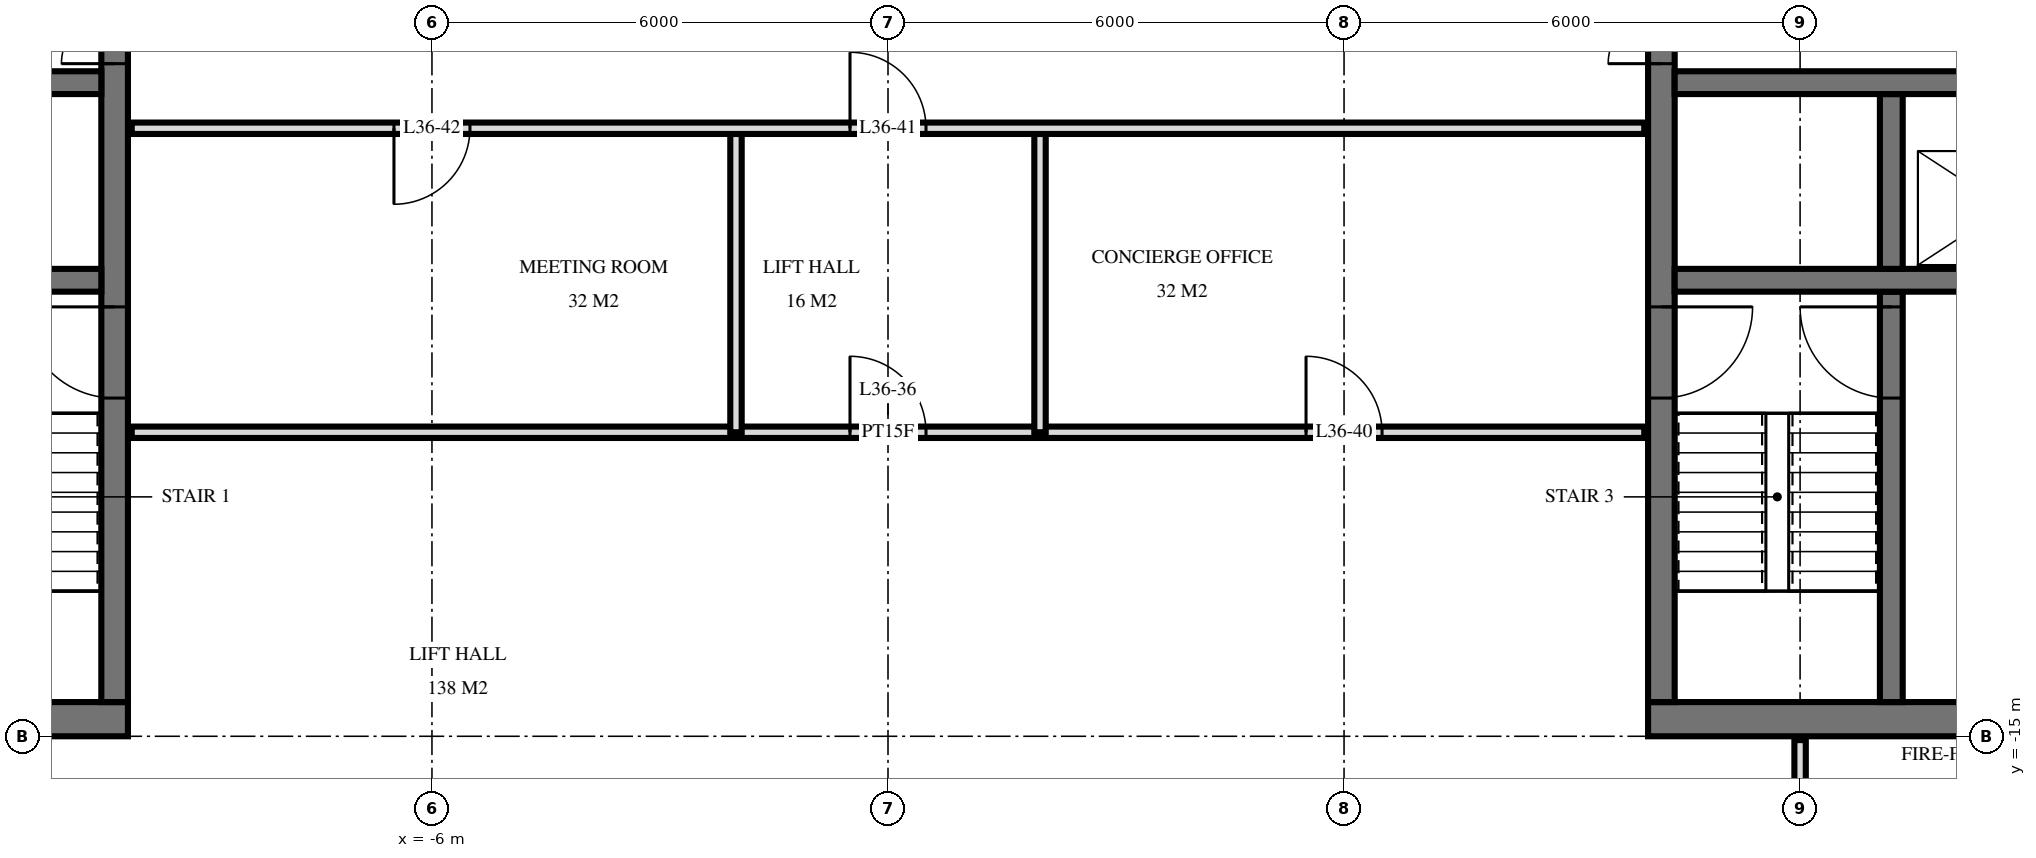
"""IFC4 building model, lengths in metres.
Left out: names, types, materials, properties, quantities, classifications, styles, units other than length and angle.
Written with IfcOpenShell. Run it as: python <this file> out.ifc"""

import sys

from ifc_helpers import new_model, si_unit, direction, frame, frame_2d, origin, place, context, subcontext, project, spatial, rectangle, extrude, element, fill, save


model = new_model("IFC4")
c1 = context("Model", 3, precision=1e-05, world=origin(), true_north=direction((0.0, 1.0)))
c2 = subcontext(c1, "Body", "Model", "MODEL_VIEW")
j1 = project(units=[si_unit("LENGTHUNIT", "METRE"), si_unit("PLANEANGLEUNIT", "RADIAN")], contexts=[c1])
p1 = place(None, origin())
s1 = spatial("IfcSite", under=j1, at=p1, CompositionType="ELEMENT")
p2 = place(p1, origin())
s2 = spatial("IfcBuilding", under=s1, at=p2, CompositionType="ELEMENT")
p3 = place(p2, frame((0.0, 0.0, 141.6)))
s3 = spatial("IfcBuildingStorey", under=s2, at=p3, CompositionType="ELEMENT", Elevation=141.6)
p4 = place(p3, frame((-24.5, -14.775, 0.0), z_axis=(0.0, 0.0, 1.0), x_axis=(1.0, 0.0, 0.0)))
e1 = element("IfcWall", 1, at=p4, inside=s3, PredefinedType="SHEAR", context=c2, shape_type="SweptSolid", body=[
    extrude(rectangle(XDim=14.5, YDim=0.45, at=frame_2d((7.25, 0.0))), origin(), (0.0, 0.0, 1.0), 3.6),
])
p5 = place(p4, frame((6.2, 0.0, 0.0)))
e2 = element("IfcOpeningElement", 2, at=p5, cuts=e1, PredefinedType="OPENING", context=c2, shape_type="SweptSolid", body=[
    extrude(rectangle(XDim=1.2, YDim=2.1, at=frame_2d((0.6, 1.05))), frame((0.0, 0.235, 0.0), z_axis=(0.0, -1.0, 0.0), x_axis=(1.0, 0.0, 0.0)), (0.0, 0.0, 1.0), 0.47),
])
p6 = place(p4, frame((9.25, 0.0, 0.0)))
e3 = element("IfcOpeningElement", 3, at=p6, cuts=e1, PredefinedType="OPENING", context=c2, shape_type="SweptSolid", body=[
    extrude(rectangle(XDim=1.1, YDim=2.1, at=frame_2d((0.55, 1.05))), frame((0.0, 0.235, 0.0), z_axis=(0.0, -1.0, 0.0), x_axis=(1.0, 0.0, 0.0)), (0.0, 0.0, 1.0), 0.47),
])
p7 = place(p4, frame((3.5, 0.0, 0.0)))
e4 = element("IfcOpeningElement", 4, at=p7, cuts=e1, PredefinedType="OPENING", context=c2, shape_type="SweptSolid", body=[
    extrude(rectangle(XDim=0.9, YDim=2.1, at=frame_2d((0.45, 1.05))), frame((0.0, 0.235, 0.0), z_axis=(0.0, -1.0, 0.0), x_axis=(1.0, 0.0, 0.0)), (0.0, 0.0, 1.0), 0.47),
])
p8 = place(p4, frame((1.05, 0.0, 0.0)))
e5 = element("IfcOpeningElement", 5, at=p8, cuts=e1, PredefinedType="OPENING", context=c2, shape_type="SweptSolid", body=[
    extrude(rectangle(XDim=1.0, YDim=2.1, at=frame_2d((0.5, 1.05))), frame((0.0, 0.235, 0.0), z_axis=(0.0, -1.0, 0.0), x_axis=(1.0, 0.0, 0.0)), (0.0, 0.0, 1.0), 0.47),
])
p9 = place(p3, frame((-10.175, -14.55, 0.0), z_axis=(0.0, 0.0, 1.0), x_axis=(0.0, 1.0, 0.0)))
e6 = element("IfcWall", 6, at=p9, inside=s3, PredefinedType="SHEAR", context=c2, shape_type="SweptSolid", body=[
    extrude(rectangle(XDim=14.1, YDim=0.35, at=frame_2d((7.05, 0.0))), origin(), (0.0, 0.0, 1.0), 3.6),
])
p10 = place(p9, frame((8.4, 0.0, 0.0)))
e7 = element("IfcOpeningElement", 7, at=p10, cuts=e6, PredefinedType="OPENING", context=c2, shape_type="SweptSolid", body=[
    extrude(rectangle(XDim=1.4, YDim=2.4, at=frame_2d((0.7, 1.2))), frame((0.0, 0.185, 0.0), z_axis=(0.0, -1.0, 0.0), x_axis=(1.0, 0.0, 0.0)), (0.0, 0.0, 1.0), 0.37),
])
p11 = place(p9, frame((10.0, 0.0, 0.0)))
e8 = element("IfcOpeningElement", 8, at=p11, cuts=e6, PredefinedType="OPENING", context=c2, shape_type="SweptSolid", body=[
    extrude(rectangle(XDim=1.4, YDim=2.4, at=frame_2d((0.7, 1.2))), frame((0.0, 0.185, 0.0), z_axis=(0.0, -1.0, 0.0), x_axis=(1.0, 0.0, 0.0)), (0.0, 0.0, 1.0), 0.37),
])
p12 = place(p9, frame((4.0, 0.0, 0.0)))
e9 = element("IfcOpeningElement", 9, at=p12, cuts=e6, PredefinedType="OPENING", context=c2, shape_type="SweptSolid", body=[
    extrude(rectangle(XDim=1.2, YDim=2.1, at=frame_2d((0.6, 1.05))), frame((0.0, 0.185, 0.0), z_axis=(0.0, -1.0, 0.0), x_axis=(1.0, 0.0, 0.0)), (0.0, 0.0, 1.0), 0.37),
])
p13 = place(p3, frame((-24.05, -6.4, 0.0), z_axis=(0.0, 0.0, 1.0), x_axis=(1.0, 0.0, 0.0)))
e10 = element("IfcWall", 10, at=p13, inside=s3, PredefinedType="SHEAR", context=c2, shape_type="SweptSolid", body=[
    extrude(rectangle(XDim=13.7, YDim=0.3, at=frame_2d((6.85, 0.0))), origin(), (0.0, 0.0, 1.0), 3.6),
])
p14 = place(p13, frame((0.55, 0.0, 0.0)))
e11 = element("IfcOpeningElement", 11, at=p14, cuts=e10, PredefinedType="OPENING", context=c2, shape_type="SweptSolid", body=[
    extrude(rectangle(XDim=1.1, YDim=2.1, at=frame_2d((0.55, 1.05))), frame((0.0, 0.16, 0.0), z_axis=(0.0, -1.0, 0.0), x_axis=(1.0, 0.0, 0.0)), (0.0, 0.0, 1.0), 0.32),
])
p15 = place(p13, frame((5.8, 0.0, 0.0)))
e12 = element("IfcOpeningElement", 12, at=p15, cuts=e10, PredefinedType="OPENING", context=c2, shape_type="SweptSolid", body=[
    extrude(rectangle(XDim=1.1, YDim=2.1, at=frame_2d((0.55, 1.05))), frame((0.0, 0.16, 0.0), z_axis=(0.0, -1.0, 0.0), x_axis=(1.0, 0.0, 0.0)), (0.0, 0.0, 1.0), 0.32),
])
p16 = place(p3, frame((-24.05, -9.0, 0.0), z_axis=(0.0, 0.0, 1.0), x_axis=(1.0, 0.0, 0.0)))
e13 = element("IfcWall", 13, at=p16, inside=s3, PredefinedType="SHEAR", context=c2, shape_type="SweptSolid", body=[
    extrude(rectangle(XDim=13.7, YDim=0.3, at=frame_2d((6.85, 0.0))), origin(), (0.0, 0.0, 1.0), 3.6),
])
p17 = place(p16, frame((8.8, 0.0, 0.0)))
e14 = element("IfcOpeningElement", 14, at=p17, cuts=e13, PredefinedType="OPENING", context=c2, shape_type="SweptSolid", body=[
    extrude(rectangle(XDim=1.1, YDim=2.1, at=frame_2d((0.55, 1.05))), frame((0.0, 0.16, 0.0), z_axis=(0.0, -1.0, 0.0), x_axis=(1.0, 0.0, 0.0)), (0.0, 0.0, 1.0), 0.32),
])
p18 = place(p3, frame((10.0, -14.775, 0.0), z_axis=(0.0, 0.0, 1.0), x_axis=(1.0, 0.0, 0.0)))
e15 = element("IfcWall", 15, at=p18, inside=s3, PredefinedType="SHEAR", context=c2, shape_type="SweptSolid", body=[
    extrude(rectangle(XDim=14.5, YDim=0.45, at=frame_2d((7.25, 0.0))), origin(), (0.0, 0.0, 1.0), 3.6),
])
p19 = place(p18, frame((7.1, 0.0, 0.0)))
e16 = element("IfcOpeningElement", 16, at=p19, cuts=e15, PredefinedType="OPENING", context=c2, shape_type="SweptSolid", body=[
    extrude(rectangle(XDim=1.2, YDim=2.1, at=frame_2d((0.6, 1.05))), frame((0.0, 0.235, 0.0), z_axis=(0.0, -1.0, 0.0), x_axis=(1.0, 0.0, 0.0)), (0.0, 0.0, 1.0), 0.47),
])
p20 = place(p18, frame((4.15, 0.0, 0.0)))
e17 = element("IfcOpeningElement", 17, at=p20, cuts=e15, PredefinedType="OPENING", context=c2, shape_type="SweptSolid", body=[
    extrude(rectangle(XDim=1.1, YDim=2.1, at=frame_2d((0.55, 1.05))), frame((0.0, 0.235, 0.0), z_axis=(0.0, -1.0, 0.0), x_axis=(1.0, 0.0, 0.0)), (0.0, 0.0, 1.0), 0.47),
])
p21 = place(p18, frame((10.1, 0.0, 0.0)))
e18 = element("IfcOpeningElement", 18, at=p21, cuts=e15, PredefinedType="OPENING", context=c2, shape_type="SweptSolid", body=[
    extrude(rectangle(XDim=0.9, YDim=2.1, at=frame_2d((0.45, 1.05))), frame((0.0, 0.235, 0.0), z_axis=(0.0, -1.0, 0.0), x_axis=(1.0, 0.0, 0.0)), (0.0, 0.0, 1.0), 0.47),
])
p22 = place(p18, frame((12.45, 0.0, 0.0)))
e19 = element("IfcOpeningElement", 19, at=p22, cuts=e15, PredefinedType="OPENING", context=c2, shape_type="SweptSolid", body=[
    extrude(rectangle(XDim=1.0, YDim=2.1, at=frame_2d((0.5, 1.05))), frame((0.0, 0.235, 0.0), z_axis=(0.0, -1.0, 0.0), x_axis=(1.0, 0.0, 0.0)), (0.0, 0.0, 1.0), 0.47),
])
p23 = place(p3, frame((10.175, -14.55, 0.0), z_axis=(0.0, 0.0, 1.0), x_axis=(0.0, 1.0, 0.0)))
e20 = element("IfcWall", 20, at=p23, inside=s3, PredefinedType="SHEAR", context=c2, shape_type="SweptSolid", body=[
    extrude(rectangle(XDim=14.1, YDim=0.35, at=frame_2d((7.05, 0.0))), origin(), (0.0, 0.0, 1.0), 3.6),
])
p24 = place(p23, frame((8.4, 0.0, 0.0)))
e21 = element("IfcOpeningElement", 21, at=p24, cuts=e20, PredefinedType="OPENING", context=c2, shape_type="SweptSolid", body=[
    extrude(rectangle(XDim=1.4, YDim=2.4, at=frame_2d((0.7, 1.2))), frame((0.0, 0.185, 0.0), z_axis=(0.0, -1.0, 0.0), x_axis=(1.0, 0.0, 0.0)), (0.0, 0.0, 1.0), 0.37),
])
p25 = place(p23, frame((10.0, 0.0, 0.0)))
e22 = element("IfcOpeningElement", 22, at=p25, cuts=e20, PredefinedType="OPENING", context=c2, shape_type="SweptSolid", body=[
    extrude(rectangle(XDim=1.4, YDim=2.4, at=frame_2d((0.7, 1.2))), frame((0.0, 0.185, 0.0), z_axis=(0.0, -1.0, 0.0), x_axis=(1.0, 0.0, 0.0)), (0.0, 0.0, 1.0), 0.37),
])
p26 = place(p23, frame((4.0, 0.0, 0.0)))
e23 = element("IfcOpeningElement", 23, at=p26, cuts=e20, PredefinedType="OPENING", context=c2, shape_type="SweptSolid", body=[
    extrude(rectangle(XDim=1.2, YDim=2.1, at=frame_2d((0.6, 1.05))), frame((0.0, 0.185, 0.0), z_axis=(0.0, -1.0, 0.0), x_axis=(1.0, 0.0, 0.0)), (0.0, 0.0, 1.0), 0.37),
])
p27 = place(p3, frame((10.35, -6.4, 0.0), z_axis=(0.0, 0.0, 1.0), x_axis=(1.0, 0.0, 0.0)))
e24 = element("IfcWall", 24, at=p27, inside=s3, PredefinedType="SHEAR", context=c2, shape_type="SweptSolid", body=[
    extrude(rectangle(XDim=13.7, YDim=0.3, at=frame_2d((6.85, 0.0))), origin(), (0.0, 0.0, 1.0), 3.6),
])
p28 = place(p27, frame((12.05, 0.0, 0.0)))
e25 = element("IfcOpeningElement", 25, at=p28, cuts=e24, PredefinedType="OPENING", context=c2, shape_type="SweptSolid", body=[
    extrude(rectangle(XDim=1.1, YDim=2.1, at=frame_2d((0.55, 1.05))), frame((0.0, 0.16, 0.0), z_axis=(0.0, -1.0, 0.0), x_axis=(1.0, 0.0, 0.0)), (0.0, 0.0, 1.0), 0.32),
])
p29 = place(p27, frame((6.8, 0.0, 0.0)))
e26 = element("IfcOpeningElement", 26, at=p29, cuts=e24, PredefinedType="OPENING", context=c2, shape_type="SweptSolid", body=[
    extrude(rectangle(XDim=1.1, YDim=2.1, at=frame_2d((0.55, 1.05))), frame((0.0, 0.16, 0.0), z_axis=(0.0, -1.0, 0.0), x_axis=(1.0, 0.0, 0.0)), (0.0, 0.0, 1.0), 0.32),
])
p30 = place(p3, frame((10.35, -9.0, 0.0), z_axis=(0.0, 0.0, 1.0), x_axis=(1.0, 0.0, 0.0)))
e27 = element("IfcWall", 27, at=p30, inside=s3, PredefinedType="SHEAR", context=c2, shape_type="SweptSolid", body=[
    extrude(rectangle(XDim=13.7, YDim=0.3, at=frame_2d((6.85, 0.0))), origin(), (0.0, 0.0, 1.0), 3.6),
])
p31 = place(p30, frame((3.8, 0.0, 0.0)))
e28 = element("IfcOpeningElement", 28, at=p31, cuts=e27, PredefinedType="OPENING", context=c2, shape_type="SweptSolid", body=[
    extrude(rectangle(XDim=1.1, YDim=2.1, at=frame_2d((0.55, 1.05))), frame((0.0, 0.16, 0.0), z_axis=(0.0, -1.0, 0.0), x_axis=(1.0, 0.0, 0.0)), (0.0, 0.0, 1.0), 0.32),
])
p32 = place(p3, frame((13.2, -8.85, 0.0), z_axis=(0.0, 0.0, 1.0), x_axis=(0.0, 1.0, 0.0)))
e29 = element("IfcWall", 29, at=p32, inside=s3, PredefinedType="SHEAR", context=c2, shape_type="SweptSolid", body=[
    extrude(rectangle(XDim=2.3, YDim=0.3, at=frame_2d((1.15, 0.0))), origin(), (0.0, 0.0, 1.0), 3.6),
])
p33 = place(p3, frame((13.2, -14.55, 0.0), z_axis=(0.0, 0.0, 1.0), x_axis=(0.0, 1.0, 0.0)))
e30 = element("IfcWall", 30, at=p33, inside=s3, PredefinedType="SHEAR", context=c2, shape_type="SweptSolid", body=[
    extrude(rectangle(XDim=5.4, YDim=0.3, at=frame_2d((2.7, 0.0))), origin(), (0.0, 0.0, 1.0), 3.6),
])
p34 = place(p33, frame((4.0, 0.0, 0.0)))
e31 = element("IfcOpeningElement", 31, at=p34, cuts=e30, PredefinedType="OPENING", context=c2, shape_type="SweptSolid", body=[
    extrude(rectangle(XDim=1.2, YDim=2.1, at=frame_2d((0.6, 1.05))), frame((0.0, 0.16, 0.0), z_axis=(0.0, -1.0, 0.0), x_axis=(1.0, 0.0, 0.0)), (0.0, 0.0, 1.0), 0.32),
])
p35 = place(p3, frame((12.0, -17.4, 0.0), z_axis=(0.0, 0.0, 1.0), x_axis=(0.0, 1.0, 0.0)))
e32 = element("IfcWall", 32, at=p35, inside=s3, PredefinedType="PARTITIONING", context=c2, shape_type="SweptSolid", body=[
    extrude(rectangle(XDim=2.35, YDim=0.15, at=frame_2d((1.175, 0.0))), origin(), (0.0, 0.0, 1.0), 3.32),
])
p36 = place(p35, frame((0.7, 0.0, 0.0)))
e33 = element("IfcOpeningElement", 33, at=p36, cuts=e32, PredefinedType="OPENING", context=c2, shape_type="SweptSolid", body=[
    extrude(rectangle(XDim=1.0, YDim=2.1, at=frame_2d((0.5, 1.05))), frame((0.0, 0.085, 0.0), z_axis=(0.0, -1.0, 0.0), x_axis=(1.0, 0.0, 0.0)), (0.0, 0.0, 1.0), 0.17),
])
for number, where, z_axis, x_axis in (
    (34, (2.0, -11.0, 0.0), (0.0, 0.0, 1.0), (0.0, 1.0, 0.0)),
    (35, (-2.0, -11.0, 0.0), (0.0, 0.0, 1.0), (0.0, 1.0, 0.0)),
):
    element("IfcWall", number, at=place(p3, frame(where, z_axis=z_axis, x_axis=x_axis)), inside=s3, PredefinedType="PARTITIONING", context=c2, shape_type="SweptSolid", body=[
        extrude(rectangle(XDim=4.0, YDim=0.15, at=frame_2d((2.0, 0.0))), origin(), (0.0, 0.0, 1.0), 3.32),
    ])
p37 = place(p3, frame((-9.95, -11.0, 0.0), z_axis=(0.0, 0.0, 1.0), x_axis=(1.0, 0.0, 0.0)))
e36 = element("IfcWall", 36, at=p37, inside=s3, PredefinedType="PARTITIONING", context=c2, shape_type="SweptSolid", body=[
    extrude(rectangle(XDim=19.9, YDim=0.15, at=frame_2d((9.95, 0.0))), origin(), (0.0, 0.0, 1.0), 3.32),
])
p38 = place(p37, frame((9.45, 0.0, 0.0)))
e37 = element("IfcOpeningElement", 37, at=p38, cuts=e36, PredefinedType="OPENING", context=c2, shape_type="SweptSolid", body=[
    extrude(rectangle(XDim=1.0, YDim=2.1, at=frame_2d((0.5, 1.05))), frame((0.0, 0.085, 0.0), z_axis=(0.0, -1.0, 0.0), x_axis=(1.0, 0.0, 0.0)), (0.0, 0.0, 1.0), 0.17),
])
p39 = place(p37, frame((15.45, 0.0, 0.0)))
e38 = element("IfcOpeningElement", 38, at=p39, cuts=e36, PredefinedType="OPENING", context=c2, shape_type="SweptSolid", body=[
    extrude(rectangle(XDim=1.0, YDim=2.1, at=frame_2d((0.5, 1.05))), frame((0.0, 0.085, 0.0), z_axis=(0.0, -1.0, 0.0), x_axis=(1.0, 0.0, 0.0)), (0.0, 0.0, 1.0), 0.17),
])
p40 = place(p3, frame((-9.95, -7.0, 0.0), z_axis=(0.0, 0.0, 1.0), x_axis=(1.0, 0.0, 0.0)))
e39 = element("IfcWall", 39, at=p40, inside=s3, PredefinedType="PARTITIONING", context=c2, shape_type="SweptSolid", body=[
    extrude(rectangle(XDim=19.9, YDim=0.15, at=frame_2d((9.95, 0.0))), origin(), (0.0, 0.0, 1.0), 3.32),
])
p41 = place(p40, frame((9.45, 0.0, 0.0)))
e40 = element("IfcOpeningElement", 40, at=p41, cuts=e39, PredefinedType="OPENING", context=c2, shape_type="SweptSolid", body=[
    extrude(rectangle(XDim=1.0, YDim=2.1, at=frame_2d((0.5, 1.05))), frame((0.0, 0.085, 0.0), z_axis=(0.0, -1.0, 0.0), x_axis=(1.0, 0.0, 0.0)), (0.0, 0.0, 1.0), 0.17),
])
p42 = place(p40, frame((3.45, 0.0, 0.0)))
e41 = element("IfcOpeningElement", 41, at=p42, cuts=e39, PredefinedType="OPENING", context=c2, shape_type="SweptSolid", body=[
    extrude(rectangle(XDim=1.0, YDim=2.1, at=frame_2d((0.5, 1.05))), frame((0.0, 0.085, 0.0), z_axis=(0.0, -1.0, 0.0), x_axis=(1.0, 0.0, 0.0)), (0.0, 0.0, 1.0), 0.17),
])
p43 = place(p10, origin())
e42 = element("IfcDoor", 42, at=p43, inside=s3, OperationType="DOUBLE_DOOR_SINGLE_SWING", PredefinedType="DOOR", context=c2, shape_type="SweptSolid", body=[
    extrude(rectangle(XDim=1.4, YDim=2.4, at=frame_2d((0.7, 1.2))), frame((0.0, 0.025, 0.0), z_axis=(0.0, -1.0, 0.0), x_axis=(1.0, 0.0, 0.0)), (0.0, 0.0, 1.0), 0.05),
])
fill(e7, e42)
p44 = place(p12, origin())
e43 = element("IfcDoor", 43, at=p44, inside=s3, OperationType="SINGLE_SWING_LEFT", PredefinedType="DOOR", context=c2, shape_type="SweptSolid", body=[
    extrude(rectangle(XDim=1.2, YDim=2.1, at=frame_2d((0.6, 1.05))), frame((0.0, 0.025, 0.0), z_axis=(0.0, -1.0, 0.0), x_axis=(1.0, 0.0, 0.0)), (0.0, 0.0, 1.0), 0.05),
])
fill(e9, e43)
p45 = place(p24, origin())
e44 = element("IfcDoor", 44, at=p45, inside=s3, OperationType="DOUBLE_DOOR_SINGLE_SWING", PredefinedType="DOOR", context=c2, shape_type="SweptSolid", body=[
    extrude(rectangle(XDim=1.4, YDim=2.4, at=frame_2d((0.7, 1.2))), frame((0.0, 0.025, 0.0), z_axis=(0.0, -1.0, 0.0), x_axis=(1.0, 0.0, 0.0)), (0.0, 0.0, 1.0), 0.05),
])
fill(e21, e44)
p46 = place(p26, frame((0.6, 0.0, 0.0), z_axis=(0.0, 0.0, 1.0), x_axis=(-1.0, 0.0, 0.0)))
e45 = element("IfcDoor", 45, at=p46, inside=s3, OperationType="SINGLE_SWING_RIGHT", PredefinedType="DOOR", context=c2, shape_type="SweptSolid", body=[
    extrude(rectangle(XDim=1.2, YDim=2.1, at=frame_2d((0.0, 1.05))), frame((0.0, -0.025, 0.0), z_axis=(0.0, 1.0, 0.0), x_axis=(-1.0, 0.0, 0.0)), (0.0, 0.0, 1.0), 0.05),
])
fill(e23, e45)
p47 = place(p34, origin())
e46 = element("IfcDoor", 46, at=p47, inside=s3, OperationType="SINGLE_SWING_LEFT", PredefinedType="DOOR", context=c2, shape_type="SweptSolid", body=[
    extrude(rectangle(XDim=1.2, YDim=2.1, at=frame_2d((0.6, 1.05))), frame((0.0, 0.025, 0.0), z_axis=(0.0, -1.0, 0.0), x_axis=(1.0, 0.0, 0.0)), (0.0, 0.0, 1.0), 0.05),
])
fill(e31, e46)
p48 = place(p38, origin())
e47 = element("IfcDoor", 47, at=p48, inside=s3, OperationType="SINGLE_SWING_RIGHT", PredefinedType="DOOR", context=c2, shape_type="SweptSolid", body=[
    extrude(rectangle(XDim=1.0, YDim=2.1, at=frame_2d((0.5, 1.05))), frame((0.0, 0.025, 0.0), z_axis=(0.0, -1.0, 0.0), x_axis=(1.0, 0.0, 0.0)), (0.0, 0.0, 1.0), 0.05),
])
fill(e37, e47)
p49 = place(p39, origin())
e48 = element("IfcDoor", 48, at=p49, inside=s3, OperationType="SINGLE_SWING_RIGHT", PredefinedType="DOOR", context=c2, shape_type="SweptSolid", body=[
    extrude(rectangle(XDim=1.0, YDim=2.1, at=frame_2d((0.5, 1.05))), frame((0.0, 0.025, 0.0), z_axis=(0.0, -1.0, 0.0), x_axis=(1.0, 0.0, 0.0)), (0.0, 0.0, 1.0), 0.05),
])
fill(e38, e48)
p50 = place(p41, origin())
e49 = element("IfcDoor", 49, at=p50, inside=s3, OperationType="SINGLE_SWING_RIGHT", PredefinedType="DOOR", context=c2, shape_type="SweptSolid", body=[
    extrude(rectangle(XDim=1.0, YDim=2.1, at=frame_2d((0.5, 1.05))), frame((0.0, 0.025, 0.0), z_axis=(0.0, -1.0, 0.0), x_axis=(1.0, 0.0, 0.0)), (0.0, 0.0, 1.0), 0.05),
])
fill(e40, e49)
p51 = place(p42, frame((0.5, 0.0, 0.0), z_axis=(0.0, 0.0, 1.0), x_axis=(-1.0, 0.0, 0.0)))
e50 = element("IfcDoor", 50, at=p51, inside=s3, OperationType="SINGLE_SWING_LEFT", PredefinedType="DOOR", context=c2, shape_type="SweptSolid", body=[
    extrude(rectangle(XDim=1.0, YDim=2.1, at=frame_2d((0.0, 1.05))), frame((0.0, -0.025, 0.0), z_axis=(0.0, 1.0, 0.0), x_axis=(-1.0, 0.0, 0.0)), (0.0, 0.0, 1.0), 0.05),
])
fill(e41, e50)
save(model, sys.argv[1])
